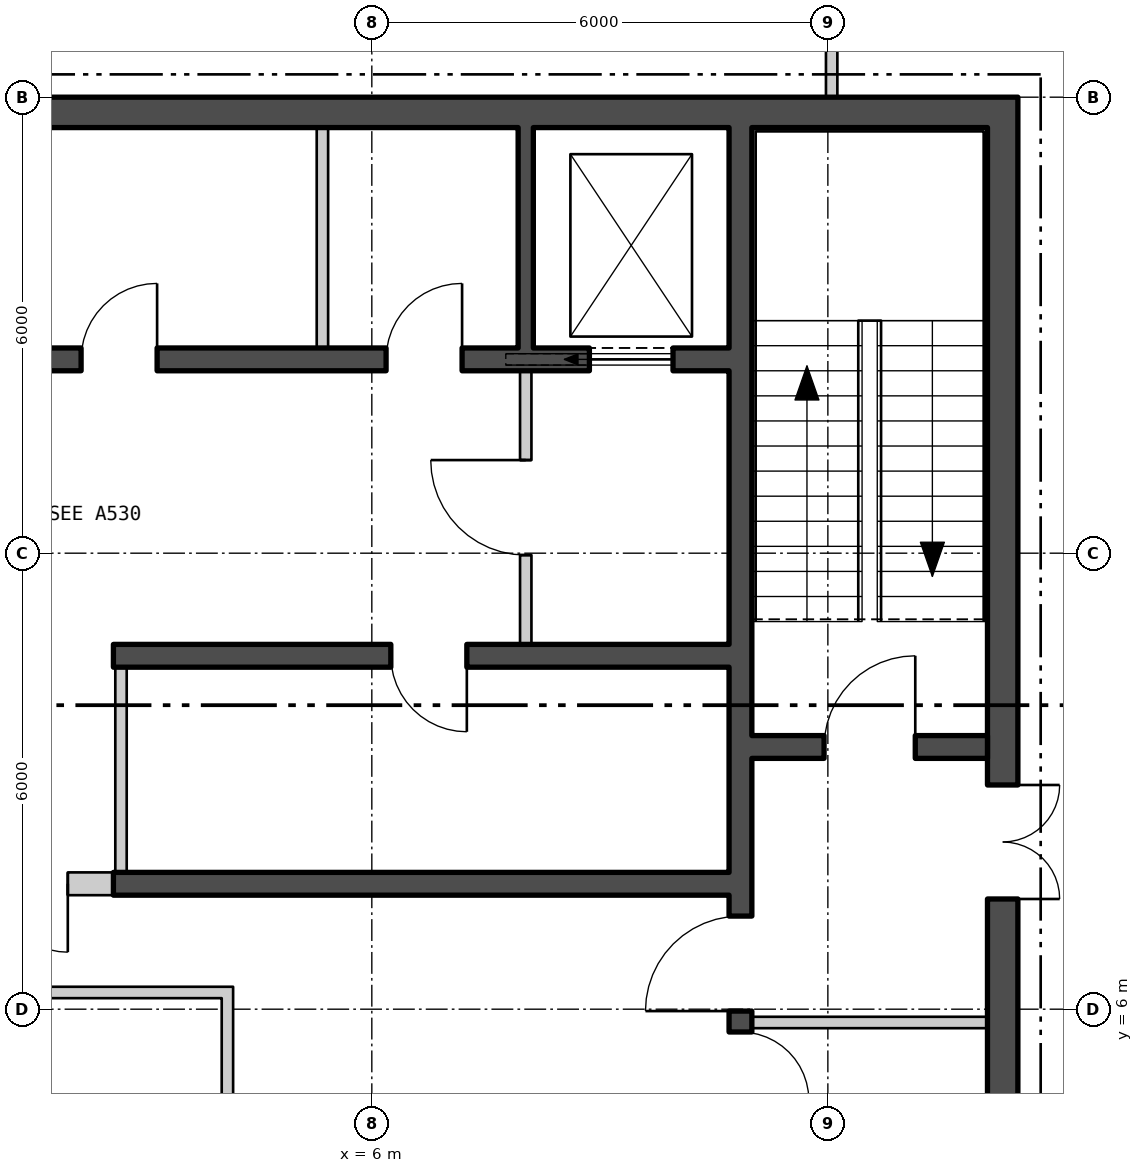
"""IFC4 building model, lengths in metres.
Left out: names, types, materials, properties, quantities, classifications, styles, units other than length and angle.
Written with IfcOpenShell. Run it as: python <this file> out.ifc"""

import sys

from ifc_helpers import new_model, si_unit, direction, frame, frame_2d, origin, place, context, subcontext, project, spatial, polyline, rectangle, outline, extrude, element, fill, save


model = new_model("IFC4")
c1 = context("Model", 3, precision=1e-05, world=origin(), true_north=direction((0.0, 1.0)))
c2 = subcontext(c1, "Body", "Model", "MODEL_VIEW")
j1 = project(units=[si_unit("LENGTHUNIT", "METRE"), si_unit("PLANEANGLEUNIT", "RADIAN")], contexts=[c1])
p1 = place(None, origin())
s1 = spatial("IfcSite", under=j1, at=p1, CompositionType="ELEMENT")
p2 = place(p1, origin())
s2 = spatial("IfcBuilding", under=s1, at=p2, CompositionType="ELEMENT")
p3 = place(p2, frame((0.0, 0.0, 245.4)))
s3 = spatial("IfcBuildingStorey", under=s2, at=p3, CompositionType="ELEMENT", Elevation=245.4)
p4 = place(p3, frame((2.975, -24.799, -0.18), z_axis=(0.0, 0.0, 1.0), x_axis=(0.500000335318, 0.866025210188, 0.0)))
e1 = element("IfcWall", 1, at=p4, inside=s3, PredefinedType="SOLIDWALL", context=c2, shape_type="SweptSolid", body=[
    extrude(outline(polyline([(-0.13, -0.225), (45.88, -0.225), (45.62, 0.225), (0.13, 0.225), (-0.13, -0.225)])), origin(), (0.0, 0.0, 1.0), 3.68),
])
p5 = place(p4, frame((1.425, 0.0, 1.08)))
e2 = element("IfcOpeningElement", 2, at=p5, cuts=e1, PredefinedType="OPENING", context=c2, shape_type="SweptSolid", body=[
    extrude(rectangle(XDim=2.4, YDim=2.0, at=frame_2d((1.2, 1.0))), frame((0.0, 0.235, 0.0), z_axis=(0.0, -1.0, 0.0), x_axis=(1.0, 0.0, 0.0)), (0.0, 0.0, 1.0), 0.47),
])
p6 = place(p4, frame((5.895, 0.0, 1.08)))
e3 = element("IfcOpeningElement", 3, at=p6, cuts=e1, PredefinedType="OPENING", context=c2, shape_type="SweptSolid", body=[
    extrude(rectangle(XDim=2.4, YDim=2.0, at=frame_2d((1.2, 1.0))), frame((0.0, 0.235, 0.0), z_axis=(0.0, -1.0, 0.0), x_axis=(1.0, 0.0, 0.0)), (0.0, 0.0, 1.0), 0.47),
])
p7 = place(p4, frame((10.403, 0.0, 1.08)))
e4 = element("IfcOpeningElement", 4, at=p7, cuts=e1, PredefinedType="OPENING", context=c2, shape_type="SweptSolid", body=[
    extrude(rectangle(XDim=2.4, YDim=2.0, at=frame_2d((1.2, 1.0))), frame((0.0, 0.235, 0.0), z_axis=(0.0, -1.0, 0.0), x_axis=(1.0, 0.0, 0.0)), (0.0, 0.0, 1.0), 0.47),
])
p8 = place(p4, frame((14.912, 0.0, 1.08)))
e5 = element("IfcOpeningElement", 5, at=p8, cuts=e1, PredefinedType="OPENING", context=c2, shape_type="SweptSolid", body=[
    extrude(rectangle(XDim=2.4, YDim=2.0, at=frame_2d((1.2, 1.0))), frame((0.0, 0.235, 0.0), z_axis=(0.0, -1.0, 0.0), x_axis=(1.0, 0.0, 0.0)), (0.0, 0.0, 1.0), 0.47),
])
p9 = place(p4, frame((19.421, 0.0, 1.08)))
e6 = element("IfcOpeningElement", 6, at=p9, cuts=e1, PredefinedType="OPENING", context=c2, shape_type="SweptSolid", body=[
    extrude(rectangle(XDim=2.4, YDim=2.0, at=frame_2d((1.2, 1.0))), frame((0.0, 0.235, 0.0), z_axis=(0.0, -1.0, 0.0), x_axis=(1.0, 0.0, 0.0)), (0.0, 0.0, 1.0), 0.47),
])
p10 = place(p4, frame((23.929, 0.0, 1.08)))
e7 = element("IfcOpeningElement", 7, at=p10, cuts=e1, PredefinedType="OPENING", context=c2, shape_type="SweptSolid", body=[
    extrude(rectangle(XDim=2.4, YDim=2.0, at=frame_2d((1.2, 1.0))), frame((0.0, 0.235, 0.0), z_axis=(0.0, -1.0, 0.0), x_axis=(1.0, 0.0, 0.0)), (0.0, 0.0, 1.0), 0.47),
])
p11 = place(p4, frame((28.438, 0.0, 1.08)))
e8 = element("IfcOpeningElement", 8, at=p11, cuts=e1, PredefinedType="OPENING", context=c2, shape_type="SweptSolid", body=[
    extrude(rectangle(XDim=2.4, YDim=2.0, at=frame_2d((1.2, 1.0))), frame((0.0, 0.235, 0.0), z_axis=(0.0, -1.0, 0.0), x_axis=(1.0, 0.0, 0.0)), (0.0, 0.0, 1.0), 0.47),
])
p12 = place(p4, frame((32.947, 0.0, 1.08)))
e9 = element("IfcOpeningElement", 9, at=p12, cuts=e1, PredefinedType="OPENING", context=c2, shape_type="SweptSolid", body=[
    extrude(rectangle(XDim=2.4, YDim=2.0, at=frame_2d((1.2, 1.0))), frame((0.0, 0.235, 0.0), z_axis=(0.0, -1.0, 0.0), x_axis=(1.0, 0.0, 0.0)), (0.0, 0.0, 1.0), 0.47),
])
p13 = place(p4, frame((37.455, 0.0, 1.08)))
e10 = element("IfcOpeningElement", 10, at=p13, cuts=e1, PredefinedType="OPENING", context=c2, shape_type="SweptSolid", body=[
    extrude(rectangle(XDim=2.4, YDim=2.0, at=frame_2d((1.2, 1.0))), frame((0.0, 0.235, 0.0), z_axis=(0.0, -1.0, 0.0), x_axis=(1.0, 0.0, 0.0)), (0.0, 0.0, 1.0), 0.47),
])
p14 = place(p4, frame((41.925, 0.0, 1.08)))
e11 = element("IfcOpeningElement", 11, at=p14, cuts=e1, PredefinedType="OPENING", context=c2, shape_type="SweptSolid", body=[
    extrude(rectangle(XDim=2.4, YDim=2.0, at=frame_2d((1.2, 1.0))), frame((0.0, 0.235, 0.0), z_axis=(0.0, -1.0, 0.0), x_axis=(1.0, 0.0, 0.0)), (0.0, 0.0, 1.0), 0.47),
])
p15 = place(p3, frame((-14.5, 17.8, 0.0), z_axis=(0.0, 0.0, 1.0), x_axis=(1.0, 0.0, 0.0)))
e12 = element("IfcWall", 12, at=p15, inside=s3, PredefinedType="SHEAR", context=c2, shape_type="SweptSolid", body=[
    extrude(rectangle(XDim=29.0, YDim=0.4, at=frame_2d((14.5, 0.0))), origin(), (0.0, 0.0, 1.0), 3.7),
])
p16 = place(p3, frame((14.3, 4.4, 0.0), z_axis=(0.0, 0.0, 1.0), x_axis=(0.0, 1.0, 0.0)))
e13 = element("IfcWall", 13, at=p16, inside=s3, PredefinedType="SHEAR", context=c2, shape_type="SweptSolid", body=[
    extrude(rectangle(XDim=13.2, YDim=0.4, at=frame_2d((6.6, 0.0))), origin(), (0.0, 0.0, 1.0), 3.7),
])
p17 = place(p16, frame((3.05, 0.0, 0.0)))
e14 = element("IfcOpeningElement", 14, at=p17, cuts=e13, PredefinedType="OPENING", context=c2, shape_type="SweptSolid", body=[
    extrude(rectangle(XDim=1.5, YDim=2.1, at=frame_2d((0.75, 1.05))), frame((0.0, 0.21, 0.0), z_axis=(0.0, -1.0, 0.0), x_axis=(1.0, 0.0, 0.0)), (0.0, 0.0, 1.0), 0.42),
])
p18 = place(p3, frame((10.85, 4.4, 0.0), z_axis=(0.0, 0.0, 1.0), x_axis=(0.0, 1.0, 0.0)))
e15 = element("IfcWall", 15, at=p18, inside=s3, PredefinedType="SHEAR", context=c2, shape_type="SweptSolid", body=[
    extrude(rectangle(XDim=13.2, YDim=0.3, at=frame_2d((6.6, 0.0))), origin(), (0.0, 0.0, 1.0), 3.7),
])
p19 = place(p18, frame((1.575, 0.0, 0.0)))
e16 = element("IfcOpeningElement", 16, at=p19, cuts=e15, PredefinedType="OPENING", context=c2, shape_type="SweptSolid", body=[
    extrude(rectangle(XDim=1.25, YDim=2.1, at=frame_2d((0.625, 1.05))), frame((0.0, 0.16, 0.0), z_axis=(0.0, -1.0, 0.0), x_axis=(1.0, 0.0, 0.0)), (0.0, 0.0, 1.0), 0.32),
])
p20 = place(p18, frame((0.4, 0.0, 0.0)))
e17 = element("IfcOpeningElement", 17, at=p20, cuts=e15, PredefinedType="OPENING", context=c2, shape_type="SweptSolid", body=[
    extrude(rectangle(XDim=0.9, YDim=2.1, at=frame_2d((0.45, 1.05))), frame((0.0, 0.16, 0.0), z_axis=(0.0, -1.0, 0.0), x_axis=(1.0, 0.0, 0.0)), (0.0, 0.0, 1.0), 0.32),
])
p21 = place(p3, frame((11.0, 9.45, 0.0), z_axis=(0.0, 0.0, 1.0), x_axis=(1.0, 0.0, 0.0)))
e18 = element("IfcWall", 18, at=p21, inside=s3, PredefinedType="SHEAR", context=c2, shape_type="SweptSolid", body=[
    extrude(rectangle(XDim=3.1, YDim=0.3, at=frame_2d((1.55, 0.0))), origin(), (0.0, 0.0, 1.0), 3.7),
])
p22 = place(p21, frame((0.95, 0.0, 0.0)))
e19 = element("IfcOpeningElement", 19, at=p22, cuts=e18, PredefinedType="OPENING", context=c2, shape_type="SweptSolid", body=[
    extrude(rectangle(XDim=1.2, YDim=2.1, at=frame_2d((0.6, 1.05))), frame((0.0, 0.16, 0.0), z_axis=(0.0, -1.0, 0.0), x_axis=(1.0, 0.0, 0.0)), (0.0, 0.0, 1.0), 0.32),
])
p23 = place(p3, frame((-10.7, 14.55, 0.0), z_axis=(0.0, 0.0, 1.0), x_axis=(1.0, 0.0, 0.0)))
e20 = element("IfcWall", 20, at=p23, inside=s3, PredefinedType="SHEAR", context=c2, shape_type="SweptSolid", body=[
    extrude(rectangle(XDim=21.4, YDim=0.3, at=frame_2d((10.7, 0.0))), origin(), (0.0, 0.0, 1.0), 3.7),
])
p24 = place(p23, frame((0.738, 0.0, 0.0)))
e21 = element("IfcOpeningElement", 21, at=p24, cuts=e20, PredefinedType="OPENING", context=c2, shape_type="SweptSolid", body=[
    extrude(rectangle(XDim=1.1, YDim=2.1, at=frame_2d((0.55, 1.05))), frame((0.0, 0.16, 0.0), z_axis=(0.0, -1.0, 0.0), x_axis=(1.0, 0.0, 0.0)), (0.0, 0.0, 1.0), 0.32),
])
p25 = place(p23, frame((3.462, 0.0, 0.0)))
e22 = element("IfcOpeningElement", 22, at=p25, cuts=e20, PredefinedType="OPENING", context=c2, shape_type="SweptSolid", body=[
    extrude(rectangle(XDim=1.1, YDim=2.1, at=frame_2d((0.55, 1.05))), frame((0.0, 0.16, 0.0), z_axis=(0.0, -1.0, 0.0), x_axis=(1.0, 0.0, 0.0)), (0.0, 0.0, 1.0), 0.32),
])
p26 = place(p23, frame((6.138, 0.0, 0.0)))
e23 = element("IfcOpeningElement", 23, at=p26, cuts=e20, PredefinedType="OPENING", context=c2, shape_type="SweptSolid", body=[
    extrude(rectangle(XDim=1.1, YDim=2.1, at=frame_2d((0.55, 1.05))), frame((0.0, 0.16, 0.0), z_axis=(0.0, -1.0, 0.0), x_axis=(1.0, 0.0, 0.0)), (0.0, 0.0, 1.0), 0.32),
])
p27 = place(p23, frame((8.812, 0.0, 0.0)))
e24 = element("IfcOpeningElement", 24, at=p27, cuts=e20, PredefinedType="OPENING", context=c2, shape_type="SweptSolid", body=[
    extrude(rectangle(XDim=1.1, YDim=2.1, at=frame_2d((0.55, 1.05))), frame((0.0, 0.16, 0.0), z_axis=(0.0, -1.0, 0.0), x_axis=(1.0, 0.0, 0.0)), (0.0, 0.0, 1.0), 0.32),
])
p28 = place(p23, frame((19.562, 0.0, 0.0)))
e25 = element("IfcOpeningElement", 25, at=p28, cuts=e20, PredefinedType="OPENING", context=c2, shape_type="SweptSolid", body=[
    extrude(rectangle(XDim=1.1, YDim=2.1, at=frame_2d((0.55, 1.05))), frame((0.0, 0.16, 0.0), z_axis=(0.0, -1.0, 0.0), x_axis=(1.0, 0.0, 0.0)), (0.0, 0.0, 1.0), 0.32),
])
p29 = place(p23, frame((12.875, 0.0, 0.0)))
e26 = element("IfcOpeningElement", 26, at=p29, cuts=e20, PredefinedType="OPENING", context=c2, shape_type="SweptSolid", body=[
    extrude(rectangle(XDim=1.0, YDim=2.1, at=frame_2d((0.5, 1.05))), frame((0.0, 0.16, 0.0), z_axis=(0.0, -1.0, 0.0), x_axis=(1.0, 0.0, 0.0)), (0.0, 0.0, 1.0), 0.32),
])
p30 = place(p23, frame((16.887, 0.0, 0.0)))
e27 = element("IfcOpeningElement", 27, at=p30, cuts=e20, PredefinedType="OPENING", context=c2, shape_type="SweptSolid", body=[
    extrude(rectangle(XDim=1.0, YDim=2.1, at=frame_2d((0.5, 1.05))), frame((0.0, 0.16, 0.0), z_axis=(0.0, -1.0, 0.0), x_axis=(1.0, 0.0, 0.0)), (0.0, 0.0, 1.0), 0.32),
])
p31 = place(p3, frame((2.6, 10.65, 0.0), z_axis=(0.0, 0.0, 1.0), x_axis=(1.0, 0.0, 0.0)))
e28 = element("IfcWall", 28, at=p31, inside=s3, PredefinedType="SHEAR", context=c2, shape_type="SweptSolid", body=[
    extrude(rectangle(XDim=8.1, YDim=0.3, at=frame_2d((4.05, 0.0))), origin(), (0.0, 0.0, 1.0), 3.7),
])
p32 = place(p31, frame((3.65, 0.0, 0.0)))
e29 = element("IfcOpeningElement", 29, at=p32, cuts=e28, PredefinedType="OPENING", context=c2, shape_type="SweptSolid", body=[
    extrude(rectangle(XDim=1.0, YDim=2.1, at=frame_2d((0.5, 1.05))), frame((0.0, 0.16, 0.0), z_axis=(0.0, -1.0, 0.0), x_axis=(1.0, 0.0, 0.0)), (0.0, 0.0, 1.0), 0.32),
])
p33 = place(p3, frame((2.6, 7.65, 0.0), z_axis=(0.0, 0.0, 1.0), x_axis=(1.0, 0.0, 0.0)))
e30 = element("IfcWall", 30, at=p33, inside=s3, PredefinedType="SHEAR", context=c2, shape_type="SweptSolid", body=[
    extrude(rectangle(XDim=8.1, YDim=0.3, at=frame_2d((4.05, 0.0))), origin(), (0.0, 0.0, 1.0), 3.7),
])
p34 = place(p3, frame((5.35, 14.7, 0.0), z_axis=(0.0, 0.0, 1.0), x_axis=(0.0, 1.0, 0.0)))
e31 = element("IfcWall", 31, at=p34, inside=s3, PredefinedType="PARTITIONING", context=c2, shape_type="SweptSolid", body=[
    extrude(rectangle(XDim=2.9, YDim=0.15, at=frame_2d((1.45, 0.0))), origin(), (0.0, 0.0, 1.0), 3.7),
])
p35 = place(p3, frame((8.025, 14.7, 0.0), z_axis=(0.0, 0.0, 1.0), x_axis=(0.0, 1.0, 0.0)))
e32 = element("IfcWall", 32, at=p35, inside=s3, PredefinedType="SHEAR", context=c2, shape_type="SweptSolid", body=[
    extrude(rectangle(XDim=2.9, YDim=0.2, at=frame_2d((1.45, 0.0))), origin(), (0.0, 0.0, 1.0), 3.7),
])
p36 = place(p3, frame((2.7, 7.8, 0.0), z_axis=(0.0, 0.0, 1.0), x_axis=(0.0, 1.0, 0.0)))
e33 = element("IfcWall", 33, at=p36, inside=s3, PredefinedType="PARTITIONING", context=c2, shape_type="SweptSolid", body=[
    extrude(rectangle(XDim=2.7, YDim=0.15, at=frame_2d((1.35, 0.0))), origin(), (0.0, 0.0, 1.0), 3.7),
])
p37 = place(p3, frame((8.025, 10.8, 0.0), z_axis=(0.0, 0.0, 1.0), x_axis=(0.0, 1.0, 0.0)))
e34 = element("IfcWall", 34, at=p37, inside=s3, PredefinedType="PARTITIONING", context=c2, shape_type="SweptSolid", body=[
    extrude(rectangle(XDim=3.6, YDim=0.15, at=frame_2d((1.8, 0.0))), origin(), (0.0, 0.0, 1.0), 3.7),
])
p38 = place(p37, frame((1.175, 0.0, 0.0)))
e35 = element("IfcOpeningElement", 35, at=p38, cuts=e34, PredefinedType="OPENING", context=c2, shape_type="SweptSolid", body=[
    extrude(rectangle(XDim=1.25, YDim=2.1, at=frame_2d((0.625, 1.05))), frame((0.0, 0.085, 0.0), z_axis=(0.0, -1.0, 0.0), x_axis=(1.0, 0.0, 0.0)), (0.0, 0.0, 1.0), 0.17),
])
p39 = place(p3, frame((11.0, 5.825, 0.0), z_axis=(0.0, 0.0, 1.0), x_axis=(1.0, 0.0, 0.0)))
e36 = element("IfcWall", 36, at=p39, inside=s3, PredefinedType="PARTITIONING", context=c2, shape_type="SweptSolid", body=[
    extrude(rectangle(XDim=3.1, YDim=0.15, at=frame_2d((1.55, 0.0))), origin(), (0.0, 0.0, 1.0), 3.7),
])
p40 = place(p3, frame((4.1, 4.4, 0.0), z_axis=(0.0, 0.0, 1.0), x_axis=(0.0, 1.0, 0.0)))
e37 = element("IfcWall", 37, at=p40, inside=s3, PredefinedType="PARTITIONING", context=c2, shape_type="SweptSolid", body=[
    extrude(rectangle(XDim=1.895, YDim=0.15, at=frame_2d((0.948, 0.0))), origin(), (0.0, 0.0, 1.0), 3.7),
])
p41 = place(p3, frame((-3.225, 6.22, 0.0), z_axis=(0.0, 0.0, 1.0), x_axis=(1.0, 0.0, 0.0)))
e38 = element("IfcWall", 38, at=p41, inside=s3, PredefinedType="PARTITIONING", context=c2, shape_type="SweptSolid", body=[
    extrude(rectangle(XDim=7.25, YDim=0.15, at=frame_2d((3.625, 0.0))), origin(), (0.0, 0.0, 1.0), 3.7),
])
p42 = place(p41, frame((3.175, 0.0, 0.0)))
e39 = element("IfcOpeningElement", 39, at=p42, cuts=e38, PredefinedType="OPENING", context=c2, shape_type="SweptSolid", body=[
    extrude(rectangle(XDim=0.9, YDim=2.1, at=frame_2d((0.45, 1.05))), frame((0.0, 0.085, 0.0), z_axis=(0.0, -1.0, 0.0), x_axis=(1.0, 0.0, 0.0)), (0.0, 0.0, 1.0), 0.17),
])
p43 = place(p3, frame((-0.4, 7.65, 0.0), z_axis=(0.0, 0.0, 1.0), x_axis=(1.0, 0.0, 0.0)))
e40 = element("IfcWall", 40, at=p43, inside=s3, PredefinedType="PARTITIONING", context=c2, shape_type="SweptSolid", body=[
    extrude(rectangle(XDim=3.0, YDim=0.3, at=frame_2d((1.5, 0.0))), origin(), (0.0, 0.0, 1.0), 3.7),
])
p44 = place(p43, frame((0.6, 0.0, 0.0)))
e41 = element("IfcOpeningElement", 41, at=p44, cuts=e40, PredefinedType="OPENING", context=c2, shape_type="SweptSolid", body=[
    extrude(rectangle(XDim=1.8, YDim=2.4, at=frame_2d((0.9, 1.2))), frame((0.0, 0.16, 0.0), z_axis=(0.0, -1.0, 0.0), x_axis=(1.0, 0.0, 0.0)), (0.0, 0.0, 1.0), 0.32),
])
p45 = place(p3, frame((12.05, 18.0, 0.0), z_axis=(0.0, 0.0, 1.0), x_axis=(0.0, 1.0, 0.0)))
e42 = element("IfcWall", 42, at=p45, inside=s3, PredefinedType="PARTITIONING", context=c2, shape_type="SweptSolid", body=[
    extrude(rectangle(XDim=1.75, YDim=0.15, at=frame_2d((0.875, 0.0))), origin(), (0.0, 0.0, 1.0), 3.7),
])
p46 = place(p28, origin())
e43 = element("IfcDoor", 43, at=p46, inside=s3, OperationType="SLIDING_TO_LEFT", PredefinedType="DOOR", context=c2, shape_type="SweptSolid", body=[
    extrude(rectangle(XDim=1.1, YDim=2.1, at=frame_2d((0.55, 1.05))), frame((0.0, 0.025, 0.0), z_axis=(0.0, -1.0, 0.0), x_axis=(1.0, 0.0, 0.0)), (0.0, 0.0, 1.0), 0.05),
])
fill(e25, e43)
p47 = place(p29, origin())
e44 = element("IfcDoor", 44, at=p47, inside=s3, OperationType="SINGLE_SWING_LEFT", PredefinedType="DOOR", context=c2, shape_type="SweptSolid", body=[
    extrude(rectangle(XDim=1.0, YDim=2.1, at=frame_2d((0.5, 1.05))), frame((0.0, 0.025, 0.0), z_axis=(0.0, -1.0, 0.0), x_axis=(1.0, 0.0, 0.0)), (0.0, 0.0, 1.0), 0.05),
])
fill(e26, e44)
p48 = place(p30, origin())
e45 = element("IfcDoor", 45, at=p48, inside=s3, OperationType="SINGLE_SWING_LEFT", PredefinedType="DOOR", context=c2, shape_type="SweptSolid", body=[
    extrude(rectangle(XDim=1.0, YDim=2.1, at=frame_2d((0.5, 1.05))), frame((0.0, 0.025, 0.0), z_axis=(0.0, -1.0, 0.0), x_axis=(1.0, 0.0, 0.0)), (0.0, 0.0, 1.0), 0.05),
])
fill(e27, e45)
p49 = place(p32, origin())
e46 = element("IfcDoor", 46, at=p49, inside=s3, OperationType="SINGLE_SWING_RIGHT", PredefinedType="DOOR", context=c2, shape_type="SweptSolid", body=[
    extrude(rectangle(XDim=1.0, YDim=2.1, at=frame_2d((0.5, 1.05))), frame((0.0, 0.025, 0.0), z_axis=(0.0, -1.0, 0.0), x_axis=(1.0, 0.0, 0.0)), (0.0, 0.0, 1.0), 0.05),
])
fill(e29, e46)
p50 = place(p38, origin())
e47 = element("IfcDoor", 47, at=p50, inside=s3, OperationType="SINGLE_SWING_LEFT", PredefinedType="DOOR", context=c2, shape_type="SweptSolid", body=[
    extrude(rectangle(XDim=1.25, YDim=2.1, at=frame_2d((0.625, 1.05))), frame((0.0, 0.025, 0.0), z_axis=(0.0, -1.0, 0.0), x_axis=(1.0, 0.0, 0.0)), (0.0, 0.0, 1.0), 0.05),
])
fill(e35, e47)
p51 = place(p22, origin())
e48 = element("IfcDoor", 48, at=p51, inside=s3, OperationType="SINGLE_SWING_LEFT", PredefinedType="DOOR", context=c2, shape_type="SweptSolid", body=[
    extrude(rectangle(XDim=1.2, YDim=2.1, at=frame_2d((0.6, 1.05))), frame((0.0, 0.025, 0.0), z_axis=(0.0, -1.0, 0.0), x_axis=(1.0, 0.0, 0.0)), (0.0, 0.0, 1.0), 0.05),
])
fill(e19, e48)
p52 = place(p19, origin())
e49 = element("IfcDoor", 49, at=p52, inside=s3, OperationType="SINGLE_SWING_RIGHT", PredefinedType="DOOR", context=c2, shape_type="SweptSolid", body=[
    extrude(rectangle(XDim=1.25, YDim=2.1, at=frame_2d((0.625, 1.05))), frame((0.0, 0.025, 0.0), z_axis=(0.0, -1.0, 0.0), x_axis=(1.0, 0.0, 0.0)), (0.0, 0.0, 1.0), 0.05),
])
fill(e16, e49)
p53 = place(p17, origin())
e50 = element("IfcDoor", 50, at=p53, inside=s3, OperationType="DOUBLE_DOOR_SINGLE_SWING", PredefinedType="DOOR", context=c2, shape_type="SweptSolid", body=[
    extrude(rectangle(XDim=1.5, YDim=2.1, at=frame_2d((0.75, 1.05))), frame((0.0, 0.025, 0.0), z_axis=(0.0, -1.0, 0.0), x_axis=(1.0, 0.0, 0.0)), (0.0, 0.0, 1.0), 0.05),
])
fill(e14, e50)
p54 = place(p20, origin())
e51 = element("IfcDoor", 51, at=p54, inside=s3, OperationType="SINGLE_SWING_LEFT", PredefinedType="DOOR", context=c2, shape_type="SweptSolid", body=[
    extrude(rectangle(XDim=0.9, YDim=2.1, at=frame_2d((0.45, 1.05))), frame((0.0, 0.025, 0.0), z_axis=(0.0, -1.0, 0.0), x_axis=(1.0, 0.0, 0.0)), (0.0, 0.0, 1.0), 0.05),
])
fill(e17, e51)
p55 = place(p44, origin())
e52 = element("IfcDoor", 52, at=p55, inside=s3, OperationType="DOUBLE_DOOR_SINGLE_SWING", PredefinedType="DOOR", context=c2, shape_type="SweptSolid", body=[
    extrude(rectangle(XDim=1.8, YDim=2.4, at=frame_2d((0.9, 1.2))), frame((0.0, 0.025, 0.0), z_axis=(0.0, -1.0, 0.0), x_axis=(1.0, 0.0, 0.0)), (0.0, 0.0, 1.0), 0.05),
])
fill(e41, e52)
save(model, sys.argv[1])
